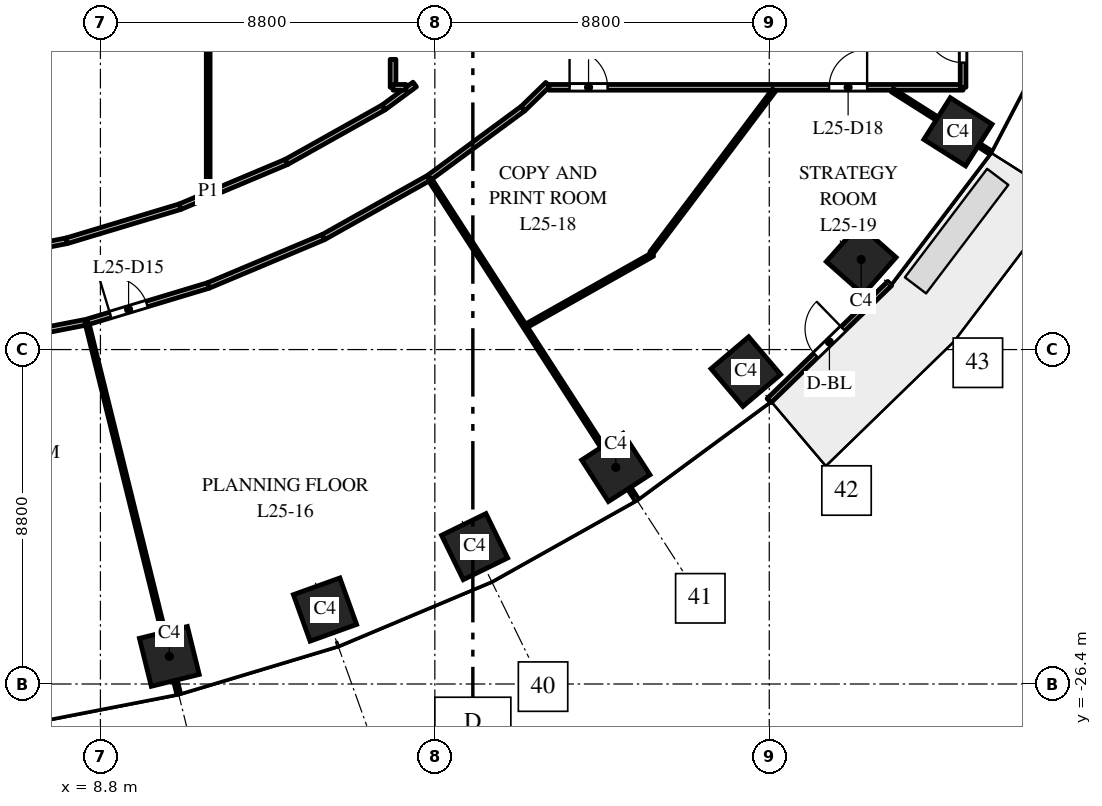
"""IFC4 building model, lengths in metres.
Left out: names, types, materials, properties, quantities, classifications, styles, units other than length and angle.
Written with IfcOpenShell. Run it as: python <this file> out.ifc"""

import sys

from ifc_helpers import new_model, si_unit, direction, frame, frame_2d, origin, origin_2d, place, context, subcontext, project, spatial, rectangle, extrude, element, fill, save


model = new_model("IFC4")
c1 = context("Model", 3, precision=1e-05, world=origin(), true_north=direction((0.0, 1.0)))
c2 = subcontext(c1, "Body", "Model", "MODEL_VIEW")
j1 = project(units=[si_unit("LENGTHUNIT", "METRE"), si_unit("PLANEANGLEUNIT", "RADIAN")], contexts=[c1])
p1 = place(None, origin())
s1 = spatial("IfcSite", under=j1, at=p1, CompositionType="ELEMENT")
p2 = place(p1, origin())
s2 = spatial("IfcBuilding", under=s1, at=p2, CompositionType="ELEMENT")
p3 = place(p2, frame((0.0, 0.0, 112.0)))
s3 = spatial("IfcBuildingStorey", under=s2, at=p3, CompositionType="ELEMENT", Elevation=112.0)
for number, where, z_axis, x_axis in (
    (1, (10.613, -25.674, 0.0), (0.0, 0.0, 1.0), (0.971, 0.24, 0.0)),
    (2, (14.709, -24.441, 0.0), (0.0, 0.0, 1.0), (0.941, 0.338, 0.0)),
    (3, (18.646, -22.785, 0.0), (0.0, 0.0, 1.0), (0.898, 0.439, 0.0)),
    (4, (22.362, -20.7, 0.0), (0.0, 0.0, 1.0), (0.84, 0.542, 0.0)),
    (5, (25.783, -18.18, 0.0), (0.0, 0.0, 1.0), (0.763, 0.646, 0.0)),
    (6, (28.819, -15.23, 0.0), (0.0, 0.0, 1.0), (0.663, 0.749, 0.0)),
    (7, (31.365, -11.871, 0.0), (0.0, 0.0, 1.0), (0.535, 0.845, 0.0)),
):
    element("IfcColumn", number, at=place(p3, frame(where, z_axis=z_axis, x_axis=x_axis)), inside=s3, PredefinedType="COLUMN", context=c2, shape_type="SweptSolid", body=[
        extrude(rectangle(XDim=1.3, YDim=1.3, at=origin_2d()), origin(), (0.0, 0.0, 1.0), 4.0),
    ])
p4 = place(p3, frame((26.396, -18.943, 0.0), z_axis=(0.0, 0.0, 1.0), x_axis=(0.717214761864, 0.696852197647, 0.0)))
e8 = element("IfcWall", 8, at=p4, inside=s3, PredefinedType="STANDARD", context=c2, shape_type="SweptSolid", body=[
    extrude(rectangle(XDim=4.424, YDim=0.15, at=frame_2d((2.212, 0.0))), origin(), (0.0, 0.0, 1.0), 3.7),
])
p5 = place(p4, frame((1.712, 0.0, 0.0)))
e9 = element("IfcOpeningElement", 9, at=p5, cuts=e8, PredefinedType="OPENING", context=c2, shape_type="SweptSolid", body=[
    extrude(rectangle(XDim=1.0, YDim=2.4, at=frame_2d((0.5, 1.2))), frame((0.0, 0.085, 0.0), z_axis=(0.0, -1.0, 0.0), x_axis=(1.0, 0.0, 0.0)), (0.0, 0.0, 1.0), 0.17),
])
p6 = place(p3, frame((4.798, -15.344, 0.0), z_axis=(0.0, 0.0, 1.0), x_axis=(0.981588545092, 0.191007665145, 0.0)))
e10 = element("IfcWall", 10, at=p6, inside=s3, PredefinedType="PARTITIONING", context=c2, shape_type="SweptSolid", body=[
    extrude(rectangle(XDim=3.172, YDim=0.15, at=frame_2d((1.586, 0.0))), origin(), (0.0, 0.0, 1.0), 3.7),
])
p7 = place(p3, frame((5.113, -17.523, 0.0), z_axis=(0.0, 0.0, 1.0), x_axis=(0.981690354374, 0.19048372143, 0.0)))
e11 = element("IfcWall", 11, at=p7, inside=s3, PredefinedType="PARTITIONING", context=c2, shape_type="SweptSolid", body=[
    extrude(rectangle(XDim=3.37, YDim=0.15, at=frame_2d((1.685, 0.0))), origin(), (0.0, 0.0, 1.0), 3.7),
])
p8 = place(p3, frame((7.912, -14.738, 0.0), z_axis=(0.0, 0.0, 1.0), x_axis=(0.957606118849, 0.28808075455, 0.0)))
e12 = element("IfcWall", 12, at=p8, inside=s3, PredefinedType="PARTITIONING", context=c2, shape_type="SweptSolid", body=[
    extrude(rectangle(XDim=3.117, YDim=0.15, at=frame_2d((1.559, 0.0))), origin(), (0.0, 0.0, 1.0), 2.85),
])
p9 = place(p3, frame((8.441, -16.88, 0.0), z_axis=(0.0, 0.0, 1.0), x_axis=(0.240079290568, -0.970753281859, 0.0)))
e13 = element("IfcWall", 13, at=p9, inside=s3, PredefinedType="PARTITIONING", context=c2, shape_type="SweptSolid", body=[
    extrude(rectangle(XDim=10.059, YDim=0.1, at=frame_2d((5.03, 0.0))), origin(), (0.0, 0.0, 1.0), 2.9),
])
p10 = place(p3, frame((8.459, -16.871, 0.0), z_axis=(0.0, 0.0, 1.0), x_axis=(0.957595601217, 0.288115713784, 0.0)))
e14 = element("IfcWall", 14, at=p10, inside=s3, PredefinedType="PARTITIONING", context=c2, shape_type="SweptSolid", body=[
    extrude(rectangle(XDim=3.325, YDim=0.15, at=frame_2d((1.663, 0.0))), origin(), (0.0, 0.0, 1.0), 2.85),
])
p11 = place(p10, frame((0.63, 0.0, 0.0)))
e15 = element("IfcOpeningElement", 15, at=p11, cuts=e14, PredefinedType="OPENING", context=c2, shape_type="SweptSolid", body=[
    extrude(rectangle(XDim=1.0, YDim=2.1, at=frame_2d((0.5, 1.05))), frame((0.0, 0.085, 0.0), z_axis=(0.0, -1.0, 0.0), x_axis=(1.0, 0.0, 0.0)), (0.0, 0.0, 1.0), 0.17),
])
p12 = place(p3, frame((10.897, -13.84, 0.0), z_axis=(0.0, 0.0, 1.0), x_axis=(0.921751821358, 0.387780324183, 0.0)))
e16 = element("IfcWall", 16, at=p12, inside=s3, PredefinedType="PARTITIONING", context=c2, shape_type="SweptSolid", body=[
    extrude(rectangle(XDim=3.038, YDim=0.15, at=frame_2d((1.519, 0.0))), origin(), (0.0, 0.0, 1.0), 3.7),
])
p13 = place(p3, frame((11.636, -13.444, 0.0), z_axis=(0.0, 0.0, 1.0), x_axis=(0.0, 1.0, 0.0)))
e17 = element("IfcWall", 17, at=p13, inside=s3, PredefinedType="PARTITIONING", context=c2, shape_type="SweptSolid", body=[
    extrude(rectangle(XDim=26.888, YDim=0.1, at=frame_2d((13.444, 0.0))), origin(), (0.0, 0.0, 1.0), 2.75),
])
p14 = place(p3, frame((11.643, -15.913, 0.0), z_axis=(0.0, 0.0, 1.0), x_axis=(0.921789499058, 0.38769075231, 0.0)))
e18 = element("IfcWall", 18, at=p14, inside=s3, PredefinedType="PARTITIONING", context=c2, shape_type="SweptSolid", body=[
    extrude(rectangle(XDim=3.278, YDim=0.15, at=frame_2d((1.639, 0.0))), origin(), (0.0, 0.0, 1.0), 3.7),
])
p15 = place(p3, frame((13.697, -12.662, 0.0), z_axis=(0.0, 0.0, 1.0), x_axis=(0.872147381065, 0.489243237767, 0.0)))
e19 = element("IfcWall", 19, at=p15, inside=s3, PredefinedType="PARTITIONING", context=c2, shape_type="SweptSolid", body=[
    extrude(rectangle(XDim=2.927, YDim=0.15, at=frame_2d((1.464, 0.0))), origin(), (0.0, 0.0, 1.0), 3.7),
])
p16 = place(p3, frame((14.665, -14.642, 0.0), z_axis=(0.0, 0.0, 1.0), x_axis=(0.871997056828, 0.4895111162, 0.0)))
e20 = element("IfcWall", 20, at=p16, inside=s3, PredefinedType="PARTITIONING", context=c2, shape_type="SweptSolid", body=[
    extrude(rectangle(XDim=3.168, YDim=0.15, at=frame_2d((1.584, 0.0))), origin(), (0.0, 0.0, 1.0), 3.7),
])
p17 = place(p3, frame((16.25, -11.23, 0.0), z_axis=(0.0, 0.0, 1.0), x_axis=(0.805055837353, 0.59319903805, 0.0)))
e21 = element("IfcWall", 21, at=p17, inside=s3, PredefinedType="PARTITIONING", context=c2, shape_type="SweptSolid", body=[
    extrude(rectangle(XDim=1.02, YDim=0.15, at=frame_2d((0.51, 0.0))), origin(), (0.0, 0.0, 1.0), 3.7),
])
p18 = place(p3, frame((16.5, -10.7, 0.0), z_axis=(0.0, 0.0, 1.0), x_axis=(0.0, 1.0, 0.0)))
e22 = element("IfcWall", 22, at=p18, inside=s3, PredefinedType="PARTITIONING", context=c2, shape_type="SweptSolid", body=[
    extrude(rectangle(XDim=0.736, YDim=0.15, at=frame_2d((0.368, 0.0))), origin(), (0.0, 0.0, 1.0), 3.7),
])
p19 = place(p3, frame((16.5, -10.7, 0.0), z_axis=(0.0, 0.0, 1.0), x_axis=(1.0, 0.0, 0.0)))
e23 = element("IfcWall", 23, at=p19, inside=s3, PredefinedType="PARTITIONING", context=c2, shape_type="SweptSolid", body=[
    extrude(rectangle(XDim=0.343, YDim=0.15, at=frame_2d((0.171, 0.0))), origin(), (0.0, 0.0, 1.0), 3.7),
])
p20 = place(p3, frame((17.447, -13.085, 0.0), z_axis=(0.0, 0.0, 1.0), x_axis=(0.542325736183, -0.840168314015, 0.0)))
e24 = element("IfcWall", 24, at=p20, inside=s3, PredefinedType="PARTITIONING", context=c2, shape_type="SweptSolid", body=[
    extrude(rectangle(XDim=10.066, YDim=0.1, at=frame_2d((5.033, 0.0))), origin(), (0.0, 0.0, 1.0), 3.7),
])
p21 = place(p3, frame((17.461, -13.07, 0.0), z_axis=(0.0, 0.0, 1.0), x_axis=(0.805228684186, 0.592964388613, 0.0)))
e25 = element("IfcWall", 25, at=p21, inside=s3, PredefinedType="PARTITIONING", context=c2, shape_type="SweptSolid", body=[
    extrude(rectangle(XDim=3.052, YDim=0.15, at=frame_2d((1.526, 0.0))), origin(), (0.0, 0.0, 1.0), 3.7),
])
p22 = place(p3, frame((19.919, -11.26, 0.0), z_axis=(0.0, 0.0, 1.0), x_axis=(0.716953986293, 0.697120492841, 0.0)))
e26 = element("IfcWall", 26, at=p22, inside=s3, PredefinedType="PARTITIONING", context=c2, shape_type="SweptSolid", body=[
    extrude(rectangle(XDim=0.911, YDim=0.15, at=frame_2d((0.456, 0.0))), origin(), (0.0, 0.0, 1.0), 2.75),
])
p23 = place(p3, frame((20.015, -16.97, 0.0), z_axis=(0.0, 0.0, 1.0), x_axis=(0.871018559545, 0.491250108324, 0.0)))
e27 = element("IfcWall", 27, at=p23, inside=s3, PredefinedType="PARTITIONING", context=c2, shape_type="SweptSolid", body=[
    extrude(rectangle(XDim=3.808, YDim=0.1, at=frame_2d((1.904, 0.0))), origin(), (0.0, 0.0, 1.0), 3.7),
])
p24 = place(p3, frame((20.603, -10.7, 0.0), z_axis=(0.0, 0.0, 1.0), x_axis=(1.0, 0.0, 0.0)))
e28 = element("IfcWall", 28, at=p24, inside=s3, PredefinedType="PARTITIONING", context=c2, shape_type="SweptSolid", body=[
    extrude(rectangle(XDim=10.897, YDim=0.15, at=frame_2d((5.448, 0.0))), origin(), (0.0, 0.0, 1.0), 2.9),
])
p25 = place(p24, frame((0.542, 0.0, 0.0)))
e29 = element("IfcOpeningElement", 29, at=p25, cuts=e28, PredefinedType="OPENING", context=c2, shape_type="SweptSolid", body=[
    extrude(rectangle(XDim=1.0, YDim=2.1, at=frame_2d((0.5, 1.05))), frame((0.0, 0.085, 0.0), z_axis=(0.0, -1.0, 0.0), x_axis=(1.0, 0.0, 0.0)), (0.0, 0.0, 1.0), 0.17),
])
p26 = place(p24, frame((7.372, 0.0, 0.0)))
e30 = element("IfcOpeningElement", 30, at=p26, cuts=e28, PredefinedType="OPENING", context=c2, shape_type="SweptSolid", body=[
    extrude(rectangle(XDim=1.0, YDim=2.1, at=frame_2d((0.5, 1.05))), frame((0.0, 0.085, 0.0), z_axis=(0.0, -1.0, 0.0), x_axis=(1.0, 0.0, 0.0)), (0.0, 0.0, 1.0), 0.17),
])
p27 = place(p3, frame((23.298, -15.06, 0.0), z_axis=(0.0, 0.0, 1.0), x_axis=(0.601658833238, 0.798753183647, 0.0)))
e31 = element("IfcWall", 31, at=p27, inside=s3, PredefinedType="PARTITIONING", context=c2, shape_type="SweptSolid", body=[
    extrude(rectangle(XDim=5.365, YDim=0.1, at=frame_2d((2.682, 0.0))), origin(), (0.0, 0.0, 1.0), 2.75),
])
p28 = place(p3, frame((29.637, -10.777, 0.0), z_axis=(0.0, 0.0, 1.0), x_axis=(0.844810627195, -0.535065420467, 0.0)))
e32 = element("IfcWall", 32, at=p28, inside=s3, PredefinedType="PARTITIONING", context=c2, shape_type="SweptSolid", body=[
    extrude(rectangle(XDim=3.048, YDim=0.1, at=frame_2d((1.524, 0.0))), origin(), (0.0, 0.0, 1.0), 2.9),
])
p29 = place(p3, frame((31.5, -10.7, 0.0), z_axis=(0.0, 0.0, 1.0), x_axis=(0.0, 1.0, 0.0)))
e33 = element("IfcWall", 33, at=p29, inside=s3, PredefinedType="PARTITIONING", context=c2, shape_type="SweptSolid", body=[
    extrude(rectangle(XDim=2.2, YDim=0.15, at=frame_2d((1.1, 0.0))), origin(), (0.0, 0.0, 1.0), 2.9),
])
p30 = place(p29, frame((0.65, 0.0, 0.0)))
e34 = element("IfcOpeningElement", 34, at=p30, cuts=e33, PredefinedType="OPENING", context=c2, shape_type="SweptSolid", body=[
    extrude(rectangle(XDim=1.0, YDim=2.1, at=frame_2d((0.5, 1.05))), frame((0.0, 0.085, 0.0), z_axis=(0.0, -1.0, 0.0), x_axis=(1.0, 0.0, 0.0)), (0.0, 0.0, 1.0), 0.17),
])
p31 = place(p5, origin())
e35 = element("IfcDoor", 35, at=p31, inside=s3, OperationType="SINGLE_SWING_RIGHT", PredefinedType="DOOR", context=c2, shape_type="SweptSolid", body=[
    extrude(rectangle(XDim=1.0, YDim=2.4, at=frame_2d((0.5, 1.2))), frame((0.0, 0.025, 0.0), z_axis=(0.0, -1.0, 0.0), x_axis=(1.0, 0.0, 0.0)), (0.0, 0.0, 1.0), 0.05),
])
fill(e9, e35)
p32 = place(p11, origin())
e36 = element("IfcDoor", 36, at=p32, inside=s3, OperationType="SINGLE_SWING_LEFT", PredefinedType="DOOR", context=c2, shape_type="SweptSolid", body=[
    extrude(rectangle(XDim=1.0, YDim=2.1, at=frame_2d((0.5, 1.05))), frame((0.0, 0.025, 0.0), z_axis=(0.0, -1.0, 0.0), x_axis=(1.0, 0.0, 0.0)), (0.0, 0.0, 1.0), 0.05),
])
fill(e15, e36)
p33 = place(p25, origin())
e37 = element("IfcDoor", 37, at=p33, inside=s3, OperationType="SINGLE_SWING_LEFT", PredefinedType="DOOR", context=c2, shape_type="SweptSolid", body=[
    extrude(rectangle(XDim=1.0, YDim=2.1, at=frame_2d((0.5, 1.05))), frame((0.0, 0.025, 0.0), z_axis=(0.0, -1.0, 0.0), x_axis=(1.0, 0.0, 0.0)), (0.0, 0.0, 1.0), 0.05),
])
fill(e29, e37)
p34 = place(p26, origin())
e38 = element("IfcDoor", 38, at=p34, inside=s3, OperationType="SINGLE_SWING_RIGHT", PredefinedType="DOOR", context=c2, shape_type="SweptSolid", body=[
    extrude(rectangle(XDim=1.0, YDim=2.1, at=frame_2d((0.5, 1.05))), frame((0.0, 0.025, 0.0), z_axis=(0.0, -1.0, 0.0), x_axis=(1.0, 0.0, 0.0)), (0.0, 0.0, 1.0), 0.05),
])
fill(e30, e38)
p35 = place(p30, origin())
e39 = element("IfcDoor", 39, at=p35, inside=s3, OperationType="SINGLE_SWING_RIGHT", PredefinedType="DOOR", context=c2, shape_type="SweptSolid", body=[
    extrude(rectangle(XDim=1.0, YDim=2.1, at=frame_2d((0.5, 1.05))), frame((0.0, 0.025, 0.0), z_axis=(0.0, -1.0, 0.0), x_axis=(1.0, 0.0, 0.0)), (0.0, 0.0, 1.0), 0.05),
])
fill(e34, e39)
save(model, sys.argv[1])
